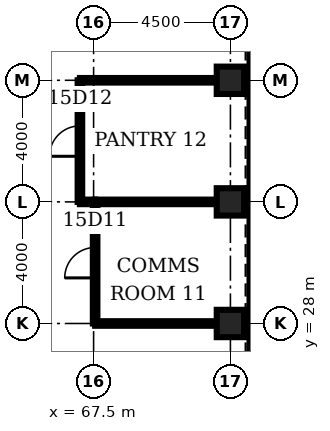
"""IFC4 building model, lengths in metres.
Left out: names, types, materials, properties, quantities, classifications, styles, units other than length and angle.
Written with IfcOpenShell. Run it as: python <this file> out.ifc"""

import sys

from ifc_helpers import new_model, si_unit, direction, frame, frame_2d, origin, origin_2d, place, context, subcontext, project, spatial, rectangle, hollow_rectangle, extrude, element, fill, save


model = new_model("IFC4")
c1 = context("Model", 3, precision=1e-05, world=origin(), true_north=direction((0.0, 1.0)))
c2 = subcontext(c1, "Body", "Model", "MODEL_VIEW")
j1 = project(units=[si_unit("LENGTHUNIT", "METRE"), si_unit("PLANEANGLEUNIT", "RADIAN")], contexts=[c1])
p1 = place(None, origin())
s1 = spatial("IfcSite", under=j1, at=p1, CompositionType="ELEMENT")
p2 = place(p1, origin())
s2 = spatial("IfcBuilding", under=s1, at=p2, CompositionType="ELEMENT")
p3 = place(p2, frame((0.0, 0.0, 72.5)))
s3 = spatial("IfcBuildingStorey", under=s2, at=p3, CompositionType="ELEMENT", Elevation=72.5)
for number, where, z_axis, x_axis in (
    (1, (72.0, 28.0, 0.0), (0.0, 0.0, 1.0), (1.0, 0.0, 0.0)),
    (2, (72.0, 32.0, 0.0), (0.0, 0.0, 1.0), (1.0, 0.0, 0.0)),
    (3, (72.0, 36.0, 0.0), (0.0, 0.0, 1.0), (1.0, 0.0, 0.0)),
):
    element("IfcColumn", number, at=place(p3, frame(where, z_axis=z_axis, x_axis=x_axis)), inside=s3, PredefinedType="COLUMN", context=c2, shape_type="SweptSolid", body=[
        extrude(hollow_rectangle(XDim=0.9, YDim=0.9, WallThickness=0.12, at=origin_2d()), origin(), (0.0, 0.0, 1.0), 4.5),
    ])
p4 = place(p3, frame((67.55, 28.0, 0.0), z_axis=(0.0, 0.0, 1.0), x_axis=(1.0, 0.0, 0.0)))
e4 = element("IfcWall", 4, at=p4, inside=s3, PredefinedType="PARTITIONING", context=c2, shape_type="SweptSolid", body=[
    extrude(rectangle(XDim=4.0, YDim=0.15, at=frame_2d((2.0, 0.0))), origin(), (0.0, 0.0, 1.0), 3.0),
])
p5 = place(p3, frame((67.05, 32.0, 0.0), z_axis=(0.0, 0.0, 1.0), x_axis=(1.0, 0.0, 0.0)))
e5 = element("IfcWall", 5, at=p5, inside=s3, PredefinedType="PARTITIONING", context=c2, shape_type="SweptSolid", body=[
    extrude(rectangle(XDim=0.5, YDim=0.15, at=frame_2d((0.25, 0.0))), origin(), (0.0, 0.0, 1.0), 3.0),
])
p6 = place(p3, frame((67.55, 32.0, 0.0), z_axis=(0.0, 0.0, 1.0), x_axis=(1.0, 0.0, 0.0)))
e6 = element("IfcWall", 6, at=p6, inside=s3, PredefinedType="PARTITIONING", context=c2, shape_type="SweptSolid", body=[
    extrude(rectangle(XDim=4.0, YDim=0.15, at=frame_2d((2.0, 0.0))), origin(), (0.0, 0.0, 1.0), 3.0),
])
p7 = place(p3, frame((67.05, 36.0, 0.0), z_axis=(0.0, 0.0, 1.0), x_axis=(1.0, 0.0, 0.0)))
e7 = element("IfcWall", 7, at=p7, inside=s3, PredefinedType="PARTITIONING", context=c2, shape_type="SweptSolid", body=[
    extrude(rectangle(XDim=4.5, YDim=0.15, at=frame_2d((2.25, 0.0))), origin(), (0.0, 0.0, 1.0), 3.0),
])
p8 = place(p3, frame((67.05, 32.0, 0.0), z_axis=(0.0, 0.0, 1.0), x_axis=(0.0, 1.0, 0.0)))
e8 = element("IfcWall", 8, at=p8, inside=s3, PredefinedType="PARTITIONING", context=c2, shape_type="SweptSolid", body=[
    extrude(rectangle(XDim=4.0, YDim=0.15, at=frame_2d((2.0, 0.0))), origin(), (0.0, 0.0, 1.0), 3.0),
])
p9 = place(p8, frame((1.5, 0.0, 0.0)))
e9 = element("IfcOpeningElement", 9, at=p9, cuts=e8, PredefinedType="OPENING", context=c2, shape_type="SweptSolid", body=[
    extrude(rectangle(XDim=1.0, YDim=2.1, at=frame_2d((0.5, 1.05))), frame((0.0, 0.085, 0.0), z_axis=(0.0, -1.0, 0.0), x_axis=(1.0, 0.0, 0.0)), (0.0, 0.0, 1.0), 0.17),
])
p10 = place(p3, frame((67.55, 28.0, 0.0), z_axis=(0.0, 0.0, 1.0), x_axis=(0.0, 1.0, 0.0)))
e10 = element("IfcWall", 10, at=p10, inside=s3, PredefinedType="PARTITIONING", context=c2, shape_type="SweptSolid", body=[
    extrude(rectangle(XDim=4.0, YDim=0.15, at=frame_2d((2.0, 0.0))), origin(), (0.0, 0.0, 1.0), 3.0),
])
p11 = place(p10, frame((1.5, 0.0, 0.0)))
e11 = element("IfcOpeningElement", 11, at=p11, cuts=e10, PredefinedType="OPENING", context=c2, shape_type="SweptSolid", body=[
    extrude(rectangle(XDim=1.0, YDim=2.1, at=frame_2d((0.5, 1.05))), frame((0.0, 0.085, 0.0), z_axis=(0.0, -1.0, 0.0), x_axis=(1.0, 0.0, 0.0)), (0.0, 0.0, 1.0), 0.17),
])
p12 = place(p11, origin())
e12 = element("IfcDoor", 12, at=p12, inside=s3, OperationType="SINGLE_SWING_LEFT", PredefinedType="DOOR", context=c2, shape_type="SweptSolid", body=[
    extrude(rectangle(XDim=1.0, YDim=2.1, at=frame_2d((0.5, 1.05))), frame((0.0, 0.025, 0.0), z_axis=(0.0, -1.0, 0.0), x_axis=(1.0, 0.0, 0.0)), (0.0, 0.0, 1.0), 0.05),
])
fill(e11, e12)
p13 = place(p9, origin())
e13 = element("IfcDoor", 13, at=p13, inside=s3, OperationType="SINGLE_SWING_LEFT", PredefinedType="DOOR", context=c2, shape_type="SweptSolid", body=[
    extrude(rectangle(XDim=1.0, YDim=2.1, at=frame_2d((0.5, 1.05))), frame((0.0, 0.025, 0.0), z_axis=(0.0, -1.0, 0.0), x_axis=(1.0, 0.0, 0.0)), (0.0, 0.0, 1.0), 0.05),
])
fill(e9, e13)
save(model, sys.argv[1])
